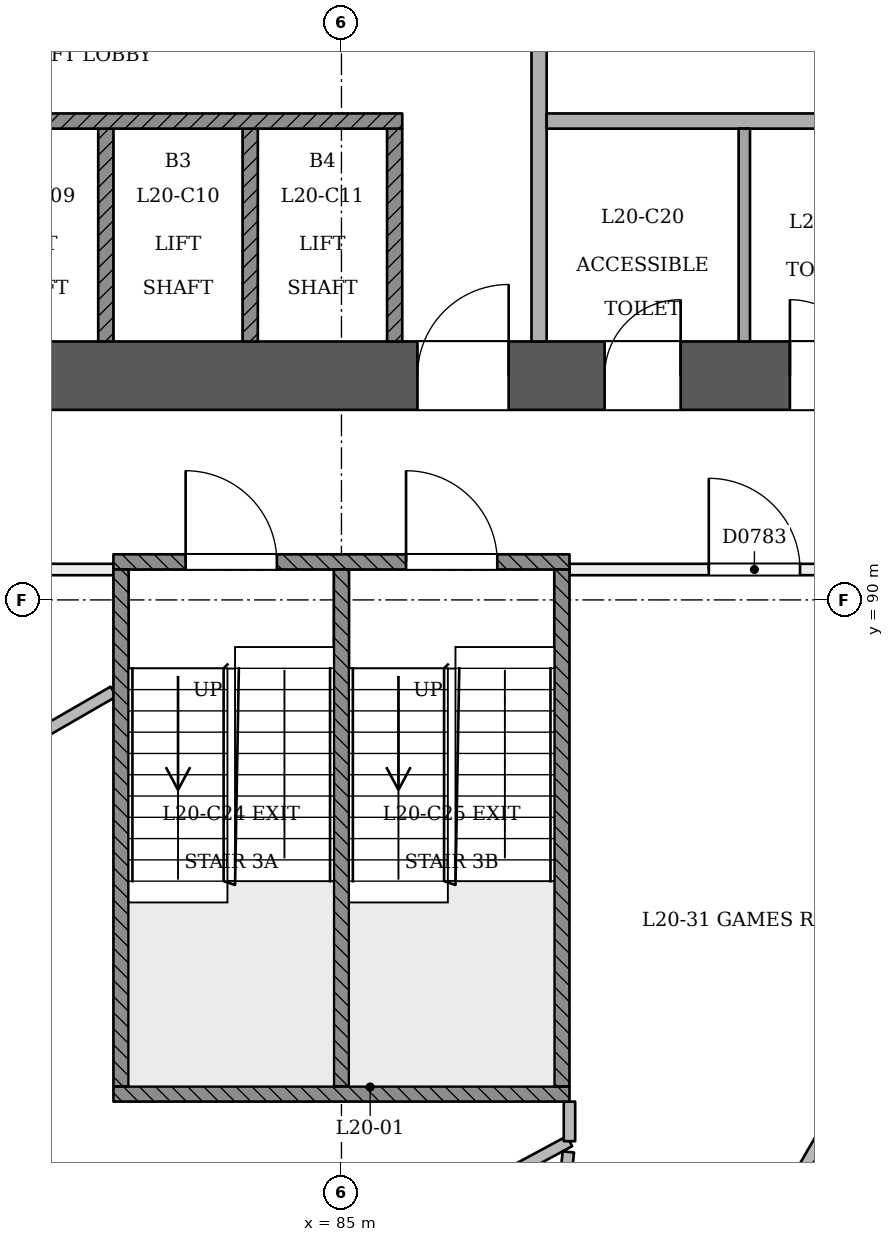
"""IFC4 building model, lengths in metres.
Left out: names, types, materials, properties, quantities, classifications, styles, units other than length and angle.
Written with IfcOpenShell. Run it as: python <this file> out.ifc"""

import sys

from ifc_helpers import new_model, si_unit, direction, frame, frame_2d, origin, place, context, subcontext, project, spatial, rectangle, extrude, element, fill, save


model = new_model("IFC4")
c1 = context("Model", 3, precision=1e-05, world=origin(), true_north=direction((0.0, 1.0)))
c2 = subcontext(c1, "Body", "Model", "MODEL_VIEW")
j1 = project(units=[si_unit("LENGTHUNIT", "METRE"), si_unit("PLANEANGLEUNIT", "RADIAN")], contexts=[c1])
p1 = place(None, origin())
s1 = spatial("IfcSite", under=j1, at=p1, CompositionType="ELEMENT")
p2 = place(p1, origin())
s2 = spatial("IfcBuilding", under=s1, at=p2, CompositionType="ELEMENT")
p3 = place(p2, frame((0.0, 0.0, 81.0)))
s3 = spatial("IfcBuildingStorey", under=s2, at=p3, CompositionType="ELEMENT", Elevation=81.0)
p4 = place(p3, frame((72.55, 92.95, 0.0), z_axis=(0.0, 0.0, 1.0), x_axis=(1.0, 0.0, 0.0)))
e1 = element("IfcWall", 1, at=p4, inside=s3, PredefinedType="SHEAR", context=c2, shape_type="SweptSolid", body=[
    extrude(rectangle(XDim=25.35, YDim=0.9, at=frame_2d((12.675, 0.0))), origin(), (0.0, 0.0, 1.0), 3.6),
])
p5 = place(p4, frame((1.25, 0.0, 0.0)))
e2 = element("IfcOpeningElement", 2, at=p5, cuts=e1, PredefinedType="OPENING", context=c2, shape_type="SweptSolid", body=[
    extrude(rectangle(XDim=1.2, YDim=2.1, at=frame_2d((0.6, 1.05))), frame((0.0, 0.46, 0.0), z_axis=(0.0, -1.0, 0.0), x_axis=(1.0, 0.0, 0.0)), (0.0, 0.0, 1.0), 0.921),
])
p6 = place(p4, frame((3.45, 0.0, 0.0)))
e3 = element("IfcOpeningElement", 3, at=p6, cuts=e1, PredefinedType="OPENING", context=c2, shape_type="SweptSolid", body=[
    extrude(rectangle(XDim=1.2, YDim=2.1, at=frame_2d((0.6, 1.05))), frame((0.0, 0.46, 0.0), z_axis=(0.0, -1.0, 0.0), x_axis=(1.0, 0.0, 0.0)), (0.0, 0.0, 1.0), 0.921),
])
p7 = place(p4, frame((13.45, 0.0, 0.0)))
e4 = element("IfcOpeningElement", 4, at=p7, cuts=e1, PredefinedType="OPENING", context=c2, shape_type="SweptSolid", body=[
    extrude(rectangle(XDim=1.2, YDim=2.1, at=frame_2d((0.6, 1.05))), frame((0.0, 0.46, 0.0), z_axis=(0.0, -1.0, 0.0), x_axis=(1.0, 0.0, 0.0)), (0.0, 0.0, 1.0), 0.921),
])
p8 = place(p4, frame((15.913, 0.0, 0.0)))
e5 = element("IfcOpeningElement", 5, at=p8, cuts=e1, PredefinedType="OPENING", context=c2, shape_type="SweptSolid", body=[
    extrude(rectangle(XDim=1.0, YDim=2.1, at=frame_2d((0.5, 1.05))), frame((0.0, 0.46, 0.0), z_axis=(0.0, -1.0, 0.0), x_axis=(1.0, 0.0, 0.0)), (0.0, 0.0, 1.0), 0.921),
])
p9 = place(p4, frame((18.35, 0.0, 0.0)))
e6 = element("IfcOpeningElement", 6, at=p9, cuts=e1, PredefinedType="OPENING", context=c2, shape_type="SweptSolid", body=[
    extrude(rectangle(XDim=1.0, YDim=2.1, at=frame_2d((0.5, 1.05))), frame((0.0, 0.46, 0.0), z_axis=(0.0, -1.0, 0.0), x_axis=(1.0, 0.0, 0.0)), (0.0, 0.0, 1.0), 0.921),
])
p10 = place(p4, frame((20.7, 0.0, 0.0)))
e7 = element("IfcOpeningElement", 7, at=p10, cuts=e1, PredefinedType="OPENING", context=c2, shape_type="SweptSolid", body=[
    extrude(rectangle(XDim=1.0, YDim=2.1, at=frame_2d((0.5, 1.05))), frame((0.0, 0.46, 0.0), z_axis=(0.0, -1.0, 0.0), x_axis=(1.0, 0.0, 0.0)), (0.0, 0.0, 1.0), 0.921),
])
p11 = place(p4, frame((22.988, 0.0, 0.0)))
e8 = element("IfcOpeningElement", 8, at=p11, cuts=e1, PredefinedType="OPENING", context=c2, shape_type="SweptSolid", body=[
    extrude(rectangle(XDim=1.0, YDim=2.1, at=frame_2d((0.5, 1.05))), frame((0.0, 0.46, 0.0), z_axis=(0.0, -1.0, 0.0), x_axis=(1.0, 0.0, 0.0)), (0.0, 0.0, 1.0), 0.921),
])
p12 = place(p3, frame((62.955, 97.34, 0.0), z_axis=(0.0, 0.0, 1.0), x_axis=(0.500000604257, -0.866025054916, 0.0)))
e9 = element("IfcWall", 9, at=p12, inside=s3, PredefinedType="PARTITIONING", context=c2, shape_type="SweptSolid", body=[
    extrude(rectangle(XDim=42.75, YDim=0.15, at=frame_2d((21.375, 0.0))), origin(), (0.0, 0.0, 1.0), 2.7),
])
p13 = place(p12, frame((0.245, 0.0, 0.0)))
e10 = element("IfcOpeningElement", 10, at=p13, cuts=e9, PredefinedType="OPENING", context=c2, shape_type="SweptSolid", body=[
    extrude(rectangle(XDim=1.2, YDim=2.1, at=frame_2d((0.6, 1.05))), frame((0.0, 0.085, 0.0), z_axis=(0.0, -1.0, 0.0), x_axis=(1.0, 0.0, 0.0)), (0.0, 0.0, 1.0), 0.171),
])
p14 = place(p12, frame((8.375, 0.0, 0.0)))
e11 = element("IfcOpeningElement", 11, at=p14, cuts=e9, PredefinedType="OPENING", context=c2, shape_type="SweptSolid", body=[
    extrude(rectangle(XDim=1.2, YDim=2.1, at=frame_2d((0.6, 1.05))), frame((0.0, 0.085, 0.0), z_axis=(0.0, -1.0, 0.0), x_axis=(1.0, 0.0, 0.0)), (0.0, 0.0, 1.0), 0.171),
])
p15 = place(p12, frame((14.125, 0.0, 0.0)))
e12 = element("IfcOpeningElement", 12, at=p15, cuts=e9, PredefinedType="OPENING", context=c2, shape_type="SweptSolid", body=[
    extrude(rectangle(XDim=1.0, YDim=2.1, at=frame_2d((0.5, 1.05))), frame((0.0, 0.085, 0.0), z_axis=(0.0, -1.0, 0.0), x_axis=(1.0, 0.0, 0.0)), (0.0, 0.0, 1.0), 0.171),
])
p16 = place(p12, frame((18.625, 0.0, 0.0)))
e13 = element("IfcOpeningElement", 13, at=p16, cuts=e9, PredefinedType="OPENING", context=c2, shape_type="SweptSolid", body=[
    extrude(rectangle(XDim=1.0, YDim=2.1, at=frame_2d((0.5, 1.05))), frame((0.0, 0.085, 0.0), z_axis=(0.0, -1.0, 0.0), x_axis=(1.0, 0.0, 0.0)), (0.0, 0.0, 1.0), 0.171),
])
p17 = place(p12, frame((26.375, 0.0, 0.0)))
e14 = element("IfcOpeningElement", 14, at=p17, cuts=e9, PredefinedType="OPENING", context=c2, shape_type="SweptSolid", body=[
    extrude(rectangle(XDim=1.2, YDim=2.1, at=frame_2d((0.6, 1.05))), frame((0.0, 0.085, 0.0), z_axis=(0.0, -1.0, 0.0), x_axis=(1.0, 0.0, 0.0)), (0.0, 0.0, 1.0), 0.171),
])
p18 = place(p12, frame((30.946, 0.0, 0.0)))
e15 = element("IfcOpeningElement", 15, at=p18, cuts=e9, PredefinedType="OPENING", context=c2, shape_type="SweptSolid", body=[
    extrude(rectangle(XDim=1.1, YDim=2.1, at=frame_2d((0.55, 1.05))), frame((0.0, 0.085, 0.0), z_axis=(0.0, -1.0, 0.0), x_axis=(1.0, 0.0, 0.0)), (0.0, 0.0, 1.0), 0.171),
])
p19 = place(p12, frame((36.625, 0.0, 0.0)))
e16 = element("IfcOpeningElement", 16, at=p19, cuts=e9, PredefinedType="OPENING", context=c2, shape_type="SweptSolid", body=[
    extrude(rectangle(XDim=1.0, YDim=2.1, at=frame_2d((0.5, 1.05))), frame((0.0, 0.085, 0.0), z_axis=(0.0, -1.0, 0.0), x_axis=(1.0, 0.0, 0.0)), (0.0, 0.0, 1.0), 0.171),
])
p20 = place(p12, frame((41.329, 0.0, 0.0)))
e17 = element("IfcOpeningElement", 17, at=p20, cuts=e9, PredefinedType="OPENING", context=c2, shape_type="SweptSolid", body=[
    extrude(rectangle(XDim=1.2, YDim=2.1, at=frame_2d((0.6, 1.05))), frame((0.0, 0.085, 0.0), z_axis=(0.0, -1.0, 0.0), x_axis=(1.0, 0.0, 0.0)), (0.0, 0.0, 1.0), 0.171),
])
p21 = place(p3, frame((85.67, 60.317, 0.0), z_axis=(0.0, 0.0, 1.0), x_axis=(0.499998839017, 0.866026074077, 0.0)))
e18 = element("IfcWall", 18, at=p21, inside=s3, PredefinedType="PARTITIONING", context=c2, shape_type="SweptSolid", body=[
    extrude(rectangle(XDim=41.239, YDim=0.15, at=frame_2d((20.62, 0.0))), origin(), (0.0, 0.0, 1.0), 2.7),
])
p22 = place(p21, frame((3.246, 0.0, 0.0)))
e19 = element("IfcOpeningElement", 19, at=p22, cuts=e18, PredefinedType="OPENING", context=c2, shape_type="SweptSolid", body=[
    extrude(rectangle(XDim=1.2, YDim=2.1, at=frame_2d((0.6, 1.05))), frame((0.0, 0.085, 0.0), z_axis=(0.0, -1.0, 0.0), x_axis=(1.0, 0.0, 0.0)), (0.0, 0.0, 1.0), 0.171),
])
p23 = place(p21, frame((10.771, 0.0, 0.0)))
e20 = element("IfcOpeningElement", 20, at=p23, cuts=e18, PredefinedType="OPENING", context=c2, shape_type="SweptSolid", body=[
    extrude(rectangle(XDim=1.0, YDim=2.1, at=frame_2d((0.5, 1.05))), frame((0.0, 0.085, 0.0), z_axis=(0.0, -1.0, 0.0), x_axis=(1.0, 0.0, 0.0)), (0.0, 0.0, 1.0), 0.171),
])
p24 = place(p21, frame((14.125, 0.0, 0.0)))
e21 = element("IfcOpeningElement", 21, at=p24, cuts=e18, PredefinedType="OPENING", context=c2, shape_type="SweptSolid", body=[
    extrude(rectangle(XDim=1.0, YDim=2.1, at=frame_2d((0.5, 1.05))), frame((0.0, 0.085, 0.0), z_axis=(0.0, -1.0, 0.0), x_axis=(1.0, 0.0, 0.0)), (0.0, 0.0, 1.0), 0.171),
])
p25 = place(p21, frame((19.771, 0.0, 0.0)))
e22 = element("IfcOpeningElement", 22, at=p25, cuts=e18, PredefinedType="OPENING", context=c2, shape_type="SweptSolid", body=[
    extrude(rectangle(XDim=1.0, YDim=2.1, at=frame_2d((0.5, 1.05))), frame((0.0, 0.085, 0.0), z_axis=(0.0, -1.0, 0.0), x_axis=(1.0, 0.0, 0.0)), (0.0, 0.0, 1.0), 0.171),
])
p26 = place(p21, frame((21.98, 0.0, 0.0)))
e23 = element("IfcOpeningElement", 23, at=p26, cuts=e18, PredefinedType="OPENING", context=c2, shape_type="SweptSolid", body=[
    extrude(rectangle(XDim=1.0, YDim=2.1, at=frame_2d((0.5, 1.05))), frame((0.0, 0.085, 0.0), z_axis=(0.0, -1.0, 0.0), x_axis=(1.0, 0.0, 0.0)), (0.0, 0.0, 1.0), 0.171),
])
p27 = place(p21, frame((28.655, 0.0, 0.0)))
e24 = element("IfcOpeningElement", 24, at=p27, cuts=e18, PredefinedType="OPENING", context=c2, shape_type="SweptSolid", body=[
    extrude(rectangle(XDim=1.0, YDim=2.1, at=frame_2d((0.5, 1.05))), frame((0.0, 0.085, 0.0), z_axis=(0.0, -1.0, 0.0), x_axis=(1.0, 0.0, 0.0)), (0.0, 0.0, 1.0), 0.171),
])
p28 = place(p21, frame((35.382, 0.0, 0.0)))
e25 = element("IfcOpeningElement", 25, at=p28, cuts=e18, PredefinedType="OPENING", context=c2, shape_type="SweptSolid", body=[
    extrude(rectangle(XDim=1.2, YDim=2.1, at=frame_2d((0.6, 1.05))), frame((0.0, 0.085, 0.0), z_axis=(0.0, -1.0, 0.0), x_axis=(1.0, 0.0, 0.0)), (0.0, 0.0, 1.0), 0.171),
])
p29 = place(p3, frame((85.0, 63.156, 0.0), z_axis=(0.0, 0.0, 1.0), x_axis=(-0.500000353961, 0.866025199425, 0.0)))
e26 = element("IfcWall", 26, at=p29, inside=s3, PredefinedType="PARTITIONING", context=c2, shape_type="SweptSolid", body=[
    extrude(rectangle(XDim=31.458, YDim=0.15, at=frame_2d((15.729, 0.0))), origin(), (0.0, 0.0, 1.0), 3.1),
])
p30 = place(p29, frame((9.276, 0.0, 0.0)))
e27 = element("IfcOpeningElement", 27, at=p30, cuts=e26, PredefinedType="OPENING", context=c2, shape_type="SweptSolid", body=[
    extrude(rectangle(XDim=1.2, YDim=2.1, at=frame_2d((0.6, 1.05))), frame((0.0, 0.085, 0.0), z_axis=(0.0, -1.0, 0.0), x_axis=(1.0, 0.0, 0.0)), (0.0, 0.0, 1.0), 0.171),
])
p31 = place(p29, frame((18.983, 0.0, 0.0)))
e28 = element("IfcOpeningElement", 28, at=p31, cuts=e26, PredefinedType="OPENING", context=c2, shape_type="SweptSolid", body=[
    extrude(rectangle(XDim=1.2, YDim=2.1, at=frame_2d((0.6, 1.05))), frame((0.0, 0.085, 0.0), z_axis=(0.0, -1.0, 0.0), x_axis=(1.0, 0.0, 0.0)), (0.0, 0.0, 1.0), 0.171),
])
p32 = place(p29, frame((25.783, 0.0, 0.0)))
e29 = element("IfcOpeningElement", 29, at=p32, cuts=e26, PredefinedType="OPENING", context=c2, shape_type="SweptSolid", body=[
    extrude(rectangle(XDim=1.2, YDim=2.1, at=frame_2d((0.6, 1.05))), frame((0.0, 0.085, 0.0), z_axis=(0.0, -1.0, 0.0), x_axis=(1.0, 0.0, 0.0)), (0.0, 0.0, 1.0), 0.171),
])
p33 = place(p3, frame((100.729, 90.4, 0.0), z_axis=(0.0, 0.0, 1.0), x_axis=(-0.499997907204, -0.866026612058, 0.0)))
e30 = element("IfcWall", 30, at=p33, inside=s3, PredefinedType="PARTITIONING", context=c2, shape_type="SweptSolid", body=[
    extrude(rectangle(XDim=31.328, YDim=0.15, at=frame_2d((15.664, 0.0))), origin(), (0.0, 0.0, 1.0), 3.1),
])
p34 = place(p33, frame((11.681, 0.0, 0.0)))
e31 = element("IfcOpeningElement", 31, at=p34, cuts=e30, PredefinedType="OPENING", context=c2, shape_type="SweptSolid", body=[
    extrude(rectangle(XDim=1.2, YDim=2.1, at=frame_2d((0.6, 1.05))), frame((0.0, 0.085, 0.0), z_axis=(0.0, -1.0, 0.0), x_axis=(1.0, 0.0, 0.0)), (0.0, 0.0, 1.0), 0.171),
])
p35 = place(p3, frame((88.0, 90.4, 0.0), z_axis=(0.0, 0.0, 1.0), x_axis=(1.0, 0.0, 0.0)))
e32 = element("IfcWall", 32, at=p35, inside=s3, PredefinedType="PARTITIONING", context=c2, shape_type="SweptSolid", body=[
    extrude(rectangle(XDim=12.599, YDim=0.15, at=frame_2d((6.3, 0.0))), origin(), (0.0, 0.0, 1.0), 3.1),
])
p36 = place(p35, frame((1.833, 0.0, 0.0)))
e33 = element("IfcOpeningElement", 33, at=p36, cuts=e32, PredefinedType="OPENING", context=c2, shape_type="SweptSolid", body=[
    extrude(rectangle(XDim=1.2, YDim=2.1, at=frame_2d((0.6, 1.05))), frame((0.0, 0.085, 0.0), z_axis=(0.0, -1.0, 0.0), x_axis=(1.0, 0.0, 0.0)), (0.0, 0.0, 1.0), 0.171),
])
p37 = place(p3, frame((69.401, 90.4, 0.0), z_axis=(0.0, 0.0, 1.0), x_axis=(1.0, 0.0, 0.0)))
e34 = element("IfcWall", 34, at=p37, inside=s3, PredefinedType="PARTITIONING", context=c2, shape_type="SweptSolid", body=[
    extrude(rectangle(XDim=12.599, YDim=0.15, at=frame_2d((6.3, 0.0))), origin(), (0.0, 0.0, 1.0), 3.1),
])
p38 = place(p3, frame((88.0, 82.879, 0.0), z_axis=(0.0, 0.0, 1.0), x_axis=(-0.880243174605, -0.474522869377, 0.0)))
e35 = element("IfcWall", 35, at=p38, inside=s3, PredefinedType="PARTITIONING", context=c2, shape_type="SweptSolid", body=[
    extrude(rectangle(XDim=12.387, YDim=0.15, at=frame_2d((6.194, 0.0))), origin(), (0.0, 0.0, 1.0), 3.1),
])
p39 = place(p3, frame((87.309, 76.274, 0.0), z_axis=(0.0, 0.0, 1.0), x_axis=(0.104014067393, 0.994575826061, 0.0)))
e36 = element("IfcWall", 36, at=p39, inside=s3, PredefinedType="PARTITIONING", context=c2, shape_type="SweptSolid", body=[
    extrude(rectangle(XDim=6.499, YDim=0.15, at=frame_2d((3.25, 0.0))), origin(), (0.0, 0.0, 1.0), 3.1),
])
p40 = place(p3, frame((95.566, 90.288, 0.0), z_axis=(0.0, 0.0, 1.0), x_axis=(-0.499995550024, -0.866027972964, 0.0)))
e37 = element("IfcWall", 37, at=p40, inside=s3, PredefinedType="PARTITIONING", context=c2, shape_type="SweptSolid", body=[
    extrude(rectangle(XDim=16.586, YDim=0.15, at=frame_2d((8.293, 0.0))), origin(), (0.0, 0.0, 1.0), 3.1),
])
p41 = place(p3, frame((88.0, 82.879, 0.0), z_axis=(0.0, 0.0, 1.0), x_axis=(0.0, 1.0, 0.0)))
e38 = element("IfcWall", 38, at=p41, inside=s3, PredefinedType="PARTITIONING", context=c2, shape_type="SweptSolid", body=[
    extrude(rectangle(XDim=0.521, YDim=0.15, at=frame_2d((0.26, 0.0))), origin(), (0.0, 0.0, 1.0), 3.1),
])
p42 = place(p3, frame((82.0, 88.794, 0.0), z_axis=(0.0, 0.0, 1.0), x_axis=(-0.866017680951, -0.500013376101, 0.0)))
e39 = element("IfcWall", 39, at=p42, inside=s3, PredefinedType="PARTITIONING", context=c2, shape_type="SweptSolid", body=[
    extrude(rectangle(XDim=10.146, YDim=0.15, at=frame_2d((5.073, 0.0))), origin(), (0.0, 0.0, 1.0), 3.1),
])
for number, where, z_axis, x_axis in (
    (40, (81.9, 93.4, 0.0), (0.0, 0.0, 1.0), (0.0, 1.0, 0.0)),
    (41, (83.8, 93.4, 0.0), (0.0, 0.0, 1.0), (0.0, 1.0, 0.0)),
    (42, (85.7, 93.4, 0.0), (0.0, 0.0, 1.0), (0.0, 1.0, 0.0)),
):
    element("IfcWall", number, at=place(p3, frame(where, z_axis=z_axis, x_axis=x_axis)), inside=s3, PredefinedType="SOLIDWALL", context=c2, shape_type="SweptSolid", body=[
        extrude(rectangle(XDim=2.8, YDim=0.2, at=frame_2d((1.4, 0.0))), origin(), (0.0, 0.0, 1.0), 3.1),
    ])
p43 = place(p3, frame((87.6, 93.4, 0.0), z_axis=(0.0, 0.0, 1.0), x_axis=(0.0, 1.0, 0.0)))
e43 = element("IfcWall", 43, at=p43, inside=s3, PredefinedType="PARTITIONING", context=c2, shape_type="SweptSolid", body=[
    extrude(rectangle(XDim=7.0, YDim=0.2, at=frame_2d((3.5, 0.0))), origin(), (0.0, 0.0, 1.0), 3.1),
])
p44 = place(p43, frame((4.45, 0.0, 0.0)))
e44 = element("IfcOpeningElement", 44, at=p44, cuts=e43, PredefinedType="OPENING", context=c2, shape_type="SweptSolid", body=[
    extrude(rectangle(XDim=1.1, YDim=2.1, at=frame_2d((0.55, 1.05))), frame((0.0, 0.11, 0.0), z_axis=(0.0, -1.0, 0.0), x_axis=(1.0, 0.0, 0.0)), (0.0, 0.0, 1.0), 0.221),
])
p45 = place(p3, frame((90.3, 93.4, 0.0), z_axis=(0.0, 0.0, 1.0), x_axis=(0.0, 1.0, 0.0)))
e45 = element("IfcWall", 45, at=p45, inside=s3, PredefinedType="PARTITIONING", context=c2, shape_type="SweptSolid", body=[
    extrude(rectangle(XDim=2.8, YDim=0.15, at=frame_2d((1.4, 0.0))), origin(), (0.0, 0.0, 1.0), 3.1),
])
p46 = place(p3, frame((78.0, 96.3, 0.0), z_axis=(0.0, 0.0, 1.0), x_axis=(1.0, 0.0, 0.0)))
e46 = element("IfcWall", 46, at=p46, inside=s3, PredefinedType="SOLIDWALL", context=c2, shape_type="SweptSolid", body=[
    extrude(rectangle(XDim=7.8, YDim=0.2, at=frame_2d((3.9, 0.0))), origin(), (0.0, 0.0, 1.0), 3.1),
])
p47 = place(p3, frame((87.7, 96.3, 0.0), z_axis=(0.0, 0.0, 1.0), x_axis=(1.0, 0.0, 0.0)))
e47 = element("IfcWall", 47, at=p47, inside=s3, PredefinedType="PARTITIONING", context=c2, shape_type="SweptSolid", body=[
    extrude(rectangle(XDim=3.6, YDim=0.2, at=frame_2d((1.8, 0.0))), origin(), (0.0, 0.0, 1.0), 3.1),
])
p48 = place(p3, frame((82.0, 90.5, 0.0), z_axis=(0.0, 0.0, 1.0), x_axis=(1.0, 0.0, 0.0)))
e48 = element("IfcWall", 48, at=p48, inside=s3, PredefinedType="SOLIDWALL", context=c2, shape_type="SweptSolid", body=[
    extrude(rectangle(XDim=6.0, YDim=0.2, at=frame_2d((3.0, 0.0))), origin(), (0.0, 0.0, 1.0), 3.1),
])
p49 = place(p48, frame((0.95, 0.0, 0.0)))
e49 = element("IfcOpeningElement", 49, at=p49, cuts=e48, PredefinedType="OPENING", context=c2, shape_type="SweptSolid", body=[
    extrude(rectangle(XDim=1.2, YDim=2.1, at=frame_2d((0.6, 1.05))), frame((0.0, 0.11, 0.0), z_axis=(0.0, -1.0, 0.0), x_axis=(1.0, 0.0, 0.0)), (0.0, 0.0, 1.0), 0.221),
])
p50 = place(p48, frame((3.85, 0.0, 0.0)))
e50 = element("IfcOpeningElement", 50, at=p50, cuts=e48, PredefinedType="OPENING", context=c2, shape_type="SweptSolid", body=[
    extrude(rectangle(XDim=1.2, YDim=2.1, at=frame_2d((0.6, 1.05))), frame((0.0, 0.11, 0.0), z_axis=(0.0, -1.0, 0.0), x_axis=(1.0, 0.0, 0.0)), (0.0, 0.0, 1.0), 0.221),
])
p51 = place(p3, frame((82.0, 83.5, 0.0), z_axis=(0.0, 0.0, 1.0), x_axis=(1.0, 0.0, 0.0)))
e51 = element("IfcWall", 51, at=p51, inside=s3, PredefinedType="SOLIDWALL", context=c2, shape_type="SweptSolid", body=[
    extrude(rectangle(XDim=6.0, YDim=0.2, at=frame_2d((3.0, 0.0))), origin(), (0.0, 0.0, 1.0), 3.1),
])
for number, where, z_axis, x_axis in (
    (52, (82.1, 83.6, 0.0), (0.0, 0.0, 1.0), (0.0, 1.0, 0.0)),
    (53, (87.9, 83.6, 0.0), (0.0, 0.0, 1.0), (0.0, 1.0, 0.0)),
    (54, (85.0, 83.6, 0.0), (0.0, 0.0, 1.0), (0.0, 1.0, 0.0)),
):
    element("IfcWall", number, at=place(p3, frame(where, z_axis=z_axis, x_axis=x_axis)), inside=s3, PredefinedType="SOLIDWALL", context=c2, shape_type="SweptSolid", body=[
        extrude(rectangle(XDim=6.8, YDim=0.2, at=frame_2d((3.4, 0.0))), origin(), (0.0, 0.0, 1.0), 3.1),
    ])
p52 = place(p36, origin())
e55 = element("IfcDoor", 55, at=p52, inside=s3, OperationType="SINGLE_SWING_LEFT", PredefinedType="NOTDEFINED", context=c2, shape_type="SweptSolid", body=[
    extrude(rectangle(XDim=1.2, YDim=2.1, at=frame_2d((0.6, 1.05))), frame((0.0, 0.025, 0.0), z_axis=(0.0, -1.0, 0.0), x_axis=(1.0, 0.0, 0.0)), (0.0, 0.0, 1.0), 0.05),
])
fill(e33, e55)
p53 = place(p7, origin())
e56 = element("IfcDoor", 56, at=p53, inside=s3, OperationType="SINGLE_SWING_RIGHT", PredefinedType="NOTDEFINED", context=c2, shape_type="SweptSolid", body=[
    extrude(rectangle(XDim=1.2, YDim=2.1, at=frame_2d((0.6, 1.05))), frame((0.0, 0.025, 0.0), z_axis=(0.0, -1.0, 0.0), x_axis=(1.0, 0.0, 0.0)), (0.0, 0.0, 1.0), 0.05),
])
fill(e4, e56)
p54 = place(p8, origin())
e57 = element("IfcDoor", 57, at=p54, inside=s3, OperationType="SINGLE_SWING_RIGHT", PredefinedType="NOTDEFINED", context=c2, shape_type="SweptSolid", body=[
    extrude(rectangle(XDim=1.0, YDim=2.1, at=frame_2d((0.5, 1.05))), frame((0.0, 0.025, 0.0), z_axis=(0.0, -1.0, 0.0), x_axis=(1.0, 0.0, 0.0)), (0.0, 0.0, 1.0), 0.05),
])
fill(e5, e57)
p55 = place(p9, origin())
e58 = element("IfcDoor", 58, at=p55, inside=s3, OperationType="SINGLE_SWING_LEFT", PredefinedType="NOTDEFINED", context=c2, shape_type="SweptSolid", body=[
    extrude(rectangle(XDim=1.0, YDim=2.1, at=frame_2d((0.5, 1.05))), frame((0.0, 0.025, 0.0), z_axis=(0.0, -1.0, 0.0), x_axis=(1.0, 0.0, 0.0)), (0.0, 0.0, 1.0), 0.05),
])
fill(e6, e58)
p56 = place(p49, origin())
e59 = element("IfcDoor", 59, at=p56, inside=s3, OperationType="SINGLE_SWING_LEFT", PredefinedType="NOTDEFINED", context=c2, shape_type="SweptSolid", body=[
    extrude(rectangle(XDim=1.2, YDim=2.1, at=frame_2d((0.6, 1.05))), frame((0.0, 0.025, 0.0), z_axis=(0.0, -1.0, 0.0), x_axis=(1.0, 0.0, 0.0)), (0.0, 0.0, 1.0), 0.05),
])
fill(e49, e59)
p57 = place(p50, origin())
e60 = element("IfcDoor", 60, at=p57, inside=s3, OperationType="SINGLE_SWING_LEFT", PredefinedType="NOTDEFINED", context=c2, shape_type="SweptSolid", body=[
    extrude(rectangle(XDim=1.2, YDim=2.1, at=frame_2d((0.6, 1.05))), frame((0.0, 0.025, 0.0), z_axis=(0.0, -1.0, 0.0), x_axis=(1.0, 0.0, 0.0)), (0.0, 0.0, 1.0), 0.05),
])
fill(e50, e60)
save(model, sys.argv[1])
